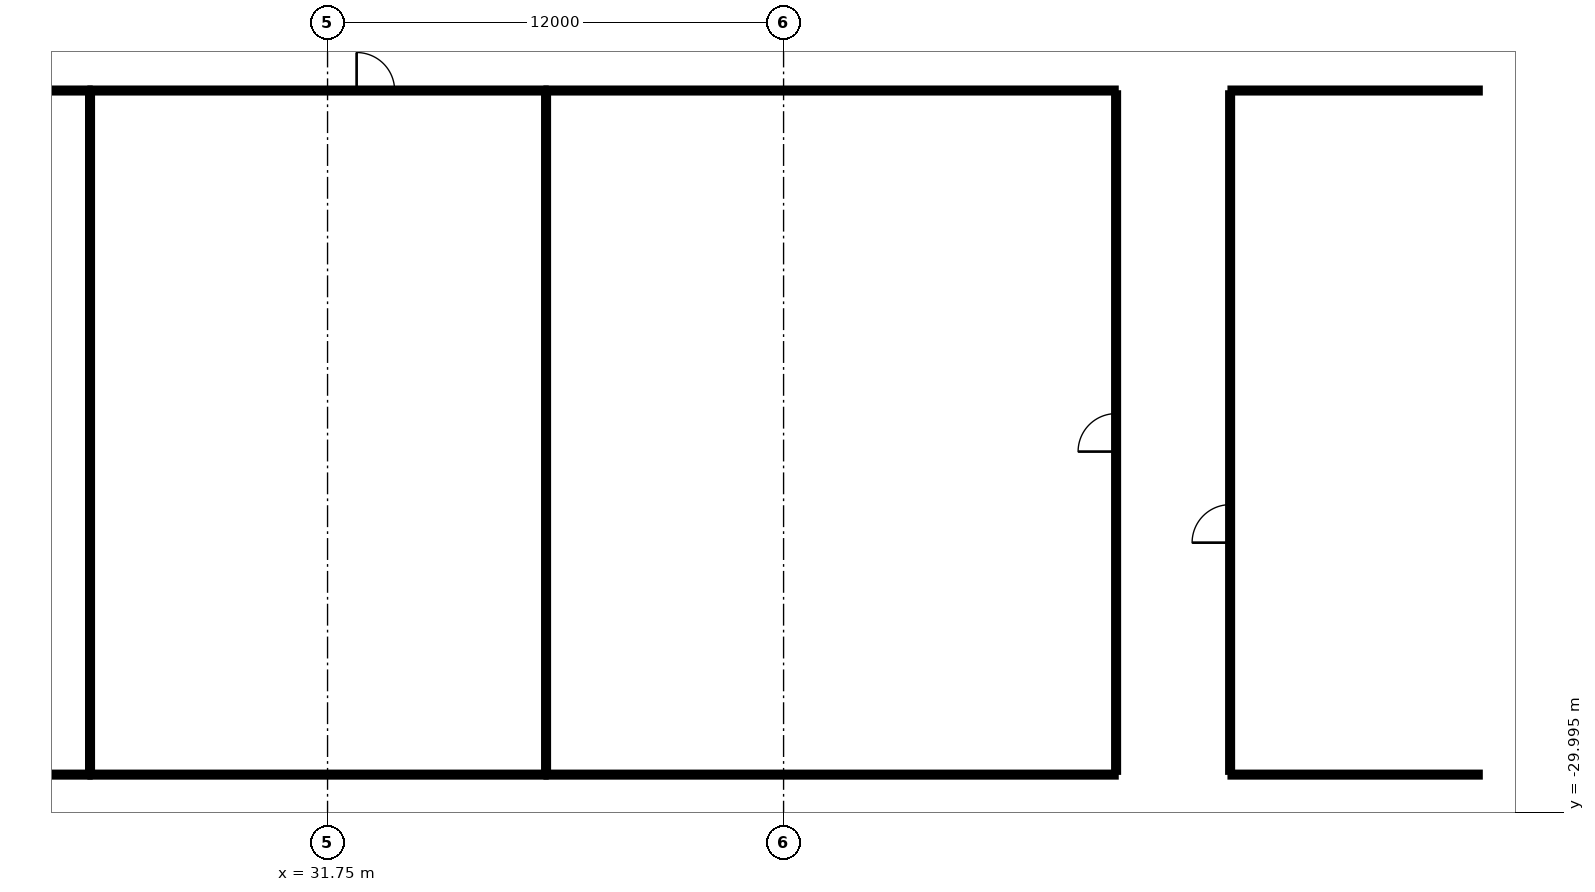
"""IFC4 building model, lengths in metres.
Left out: names, types, materials, properties, quantities, classifications, styles, units other than length and angle.
Written with IfcOpenShell. Run it as: python <this file> out.ifc"""

import sys

from ifc_helpers import new_model, si_unit, direction, frame, frame_2d, origin, origin_2d, place, context, subcontext, project, spatial, rectangle, hollow_rectangle, circle, extrude, element, fill, save


model = new_model("IFC4")
c1 = context("Model", 3, precision=1e-05, world=origin(), true_north=direction((0.0, 1.0)))
c2 = subcontext(c1, "Body", "Model", "MODEL_VIEW")
j1 = project(units=[si_unit("LENGTHUNIT", "METRE"), si_unit("PLANEANGLEUNIT", "RADIAN")], contexts=[c1])
p1 = place(None, origin())
s1 = spatial("IfcSite", under=j1, at=p1, CompositionType="ELEMENT")
p2 = place(p1, origin())
s2 = spatial("IfcBuilding", under=s1, at=p2, CompositionType="ELEMENT")
p3 = place(p2, frame((0.0, 0.0, 7.0)))
s3 = spatial("IfcBuildingStorey", under=s2, at=p3, CompositionType="ELEMENT", Elevation=7.0)
for number, where, z_axis, x_axis in (
    (1, (54.6, -26.0, 0.0), (0.0, 0.0, 1.0), (1.0, 0.0, 0.0)),
    (2, (54.6, -12.6, 0.0), (0.0, 0.0, 1.0), (1.0, 0.0, 0.0)),
    (3, (59.4, -26.0, 0.0), (0.0, 0.0, 1.0), (1.0, 0.0, 0.0)),
    (4, (59.4, -12.6, 0.0), (0.0, 0.0, 1.0), (1.0, 0.0, 0.0)),
):
    element("IfcColumn", number, at=place(p3, frame(where, z_axis=z_axis, x_axis=x_axis)), inside=s3, PredefinedType="COLUMN", context=c2, shape_type="SweptSolid", body=[
        extrude(circle(Radius=0.6, at=origin_2d()), origin(), (0.0, 0.0, 1.0), 5.0),
    ])
for number, where, z_axis, x_axis in (
    (5, (25.643, -22.79, 0.0), (0.0, 0.0, 1.0), (-0.259, -0.966, 0.0)),
    (6, (37.553, -21.658, 0.0), (0.0, 0.0, 1.0), (0.259, -0.966, 0.0)),
):
    element("IfcColumn", number, at=place(p3, frame(where, z_axis=z_axis, x_axis=x_axis)), inside=s3, PredefinedType="COLUMN", context=c2, shape_type="SweptSolid", body=[
        extrude(hollow_rectangle(XDim=1.5, YDim=1.5, WallThickness=0.07, at=origin_2d()), origin(), (0.0, 0.0, 1.0), 5.0),
    ])
p4 = place(p3, frame((16.5, -11.0, 0.0), z_axis=(0.0, 0.0, 1.0), x_axis=(1.0, 0.0, 0.0)))
e7 = element("IfcWall", 7, at=p4, inside=s3, PredefinedType="PARTITIONING", context=c2, shape_type="SweptSolid", body=[
    extrude(rectangle(XDim=9.0, YDim=0.125, at=frame_2d((4.5, 0.0))), origin(), (0.0, 0.0, 1.0), 3.996),
])
p5 = place(p4, frame((2.935, 0.0, 0.0)))
e8 = element("IfcOpeningElement", 8, at=p5, cuts=e7, PredefinedType="OPENING", context=c2, shape_type="SweptSolid", body=[
    extrude(rectangle(XDim=1.0, YDim=2.1, at=frame_2d((0.5, 1.05))), frame((0.0, 0.073, 0.0), z_axis=(0.0, -1.0, 0.0), x_axis=(1.0, 0.0, 0.0)), (0.0, 0.0, 1.0), 0.145),
])
p6 = place(p3, frame((25.5, -11.0, 0.0), z_axis=(0.0, 0.0, 1.0), x_axis=(1.0, 0.0, 0.0)))
e9 = element("IfcWall", 9, at=p6, inside=s3, PredefinedType="PARTITIONING", context=c2, shape_type="SweptSolid", body=[
    extrude(rectangle(XDim=12.0, YDim=0.125, at=frame_2d((6.0, 0.0))), origin(), (0.0, 0.0, 1.0), 3.918),
])
p7 = place(p6, frame((7.015, 0.0, 0.0)))
e10 = element("IfcOpeningElement", 10, at=p7, cuts=e9, PredefinedType="OPENING", context=c2, shape_type="SweptSolid", body=[
    extrude(rectangle(XDim=1.0, YDim=2.1, at=frame_2d((0.5, 1.05))), frame((0.0, 0.073, 0.0), z_axis=(0.0, -1.0, 0.0), x_axis=(1.0, 0.0, 0.0)), (0.0, 0.0, 1.0), 0.145),
])
p8 = place(p3, frame((37.5, -11.0, 0.0), z_axis=(0.0, 0.0, 1.0), x_axis=(1.0, 0.0, 0.0)))
e11 = element("IfcWall", 11, at=p8, inside=s3, PredefinedType="PARTITIONING", context=c2, shape_type="SweptSolid", body=[
    extrude(rectangle(XDim=15.0, YDim=0.125, at=frame_2d((7.5, 0.0))), origin(), (0.0, 0.0, 1.0), 3.996),
])
p9 = place(p3, frame((55.5, -11.0, 0.0), z_axis=(0.0, 0.0, 1.0), x_axis=(1.0, 0.0, 0.0)))
e12 = element("IfcWall", 12, at=p9, inside=s3, PredefinedType="PARTITIONING", context=c2, shape_type="SweptSolid", body=[
    extrude(rectangle(XDim=6.58, YDim=0.125, at=frame_2d((3.29, 0.0))), origin(), (0.0, 0.0, 1.0), 3.762),
])
p10 = place(p3, frame((25.5, -29.0, 0.0), z_axis=(0.0, 0.0, 1.0), x_axis=(-1.0, 0.0, 0.0)))
e13 = element("IfcWall", 13, at=p10, inside=s3, PredefinedType="PARTITIONING", context=c2, shape_type="SweptSolid", body=[
    extrude(rectangle(XDim=9.0, YDim=0.125, at=frame_2d((4.5, 0.0))), origin(), (0.0, 0.0, 1.0), 3.762),
])
p11 = place(p3, frame((37.5, -29.0, 0.0), z_axis=(0.0, 0.0, 1.0), x_axis=(-1.0, 0.0, 0.0)))
e14 = element("IfcWall", 14, at=p11, inside=s3, PredefinedType="PARTITIONING", context=c2, shape_type="SweptSolid", body=[
    extrude(rectangle(XDim=12.0, YDim=0.125, at=frame_2d((6.0, 0.0))), origin(), (0.0, 0.0, 1.0), 3.762),
])
p12 = place(p3, frame((52.5, -29.0, 0.0), z_axis=(0.0, 0.0, 1.0), x_axis=(-1.0, 0.0, 0.0)))
e15 = element("IfcWall", 15, at=p12, inside=s3, PredefinedType="PARTITIONING", context=c2, shape_type="SweptSolid", body=[
    extrude(rectangle(XDim=15.0, YDim=0.125, at=frame_2d((7.5, 0.0))), origin(), (0.0, 0.0, 1.0), 3.762),
])
p13 = place(p3, frame((62.08, -29.0, 0.0), z_axis=(0.0, 0.0, 1.0), x_axis=(-1.0, 0.0, 0.0)))
e16 = element("IfcWall", 16, at=p13, inside=s3, PredefinedType="PARTITIONING", context=c2, shape_type="SweptSolid", body=[
    extrude(rectangle(XDim=6.58, YDim=0.125, at=frame_2d((3.29, 0.0))), origin(), (0.0, 0.0, 1.0), 3.762),
])
p14 = place(p3, frame((52.5, -11.062, 0.0), z_axis=(0.0, 0.0, 1.0), x_axis=(0.0, -1.0, 0.0)))
e17 = element("IfcWall", 17, at=p14, inside=s3, PredefinedType="PARTITIONING", context=c2, shape_type="SweptSolid", body=[
    extrude(rectangle(XDim=17.875, YDim=0.125, at=frame_2d((8.938, 0.0))), origin(), (0.0, 0.0, 1.0), 3.48),
])
p15 = place(p14, frame((8.438, 0.0, 0.0)))
e18 = element("IfcOpeningElement", 18, at=p15, cuts=e17, PredefinedType="OPENING", context=c2, shape_type="SweptSolid", body=[
    extrude(rectangle(XDim=1.0, YDim=2.1, at=frame_2d((0.5, 1.05))), frame((0.0, 0.073, 0.0), z_axis=(0.0, -1.0, 0.0), x_axis=(1.0, 0.0, 0.0)), (0.0, 0.0, 1.0), 0.145),
])
p16 = place(p3, frame((55.5, -28.938, 0.0), z_axis=(0.0, 0.0, 1.0), x_axis=(0.0, 1.0, 0.0)))
e19 = element("IfcWall", 19, at=p16, inside=s3, PredefinedType="PARTITIONING", context=c2, shape_type="SweptSolid", body=[
    extrude(rectangle(XDim=17.875, YDim=0.125, at=frame_2d((8.938, 0.0))), origin(), (0.0, 0.0, 1.0), 3.48),
])
p17 = place(p16, frame((6.041, 0.0, 0.0)))
e20 = element("IfcOpeningElement", 20, at=p17, cuts=e19, PredefinedType="OPENING", context=c2, shape_type="SweptSolid", body=[
    extrude(rectangle(XDim=1.0, YDim=2.1, at=frame_2d((0.5, 1.05))), frame((0.0, 0.073, 0.0), z_axis=(0.0, -1.0, 0.0), x_axis=(1.0, 0.0, 0.0)), (0.0, 0.0, 1.0), 0.145),
])
for number, where, z_axis, x_axis in (
    (21, (25.5, -28.938, 0.0), (0.0, 0.0, 1.0), (0.0, 1.0, 0.0)),
    (22, (37.5, -28.938, 0.0), (0.0, 0.0, 1.0), (0.0, 1.0, 0.0)),
):
    element("IfcWall", number, at=place(p3, frame(where, z_axis=z_axis, x_axis=x_axis)), inside=s3, PredefinedType="PARTITIONING", context=c2, shape_type="SweptSolid", body=[
        extrude(rectangle(XDim=17.875, YDim=0.125, at=frame_2d((8.938, 0.0))), origin(), (0.0, 0.0, 1.0), 3.996),
    ])
p18 = place(p7, origin())
e23 = element("IfcDoor", 23, at=p18, inside=s3, OperationType="SINGLE_SWING_LEFT", PredefinedType="DOOR", context=c2, shape_type="SweptSolid", body=[
    extrude(rectangle(XDim=1.0, YDim=2.1, at=frame_2d((0.5, 1.05))), frame((0.0, 0.025, 0.0), z_axis=(0.0, -1.0, 0.0), x_axis=(1.0, 0.0, 0.0)), (0.0, 0.0, 1.0), 0.05),
])
fill(e10, e23)
p19 = place(p15, origin())
e24 = element("IfcDoor", 24, at=p19, inside=s3, OperationType="SINGLE_SWING_RIGHT", PredefinedType="DOOR", context=c2, shape_type="SweptSolid", body=[
    extrude(rectangle(XDim=1.0, YDim=2.1, at=frame_2d((0.5, 1.05))), frame((0.0, 0.025, 0.0), z_axis=(0.0, -1.0, 0.0), x_axis=(1.0, 0.0, 0.0)), (0.0, 0.0, 1.0), 0.05),
])
fill(e18, e24)
p20 = place(p17, origin())
e25 = element("IfcDoor", 25, at=p20, inside=s3, OperationType="SINGLE_SWING_LEFT", PredefinedType="DOOR", context=c2, shape_type="SweptSolid", body=[
    extrude(rectangle(XDim=1.0, YDim=2.1, at=frame_2d((0.5, 1.05))), frame((0.0, 0.025, 0.0), z_axis=(0.0, -1.0, 0.0), x_axis=(1.0, 0.0, 0.0)), (0.0, 0.0, 1.0), 0.05),
])
fill(e20, e25)
save(model, sys.argv[1])
